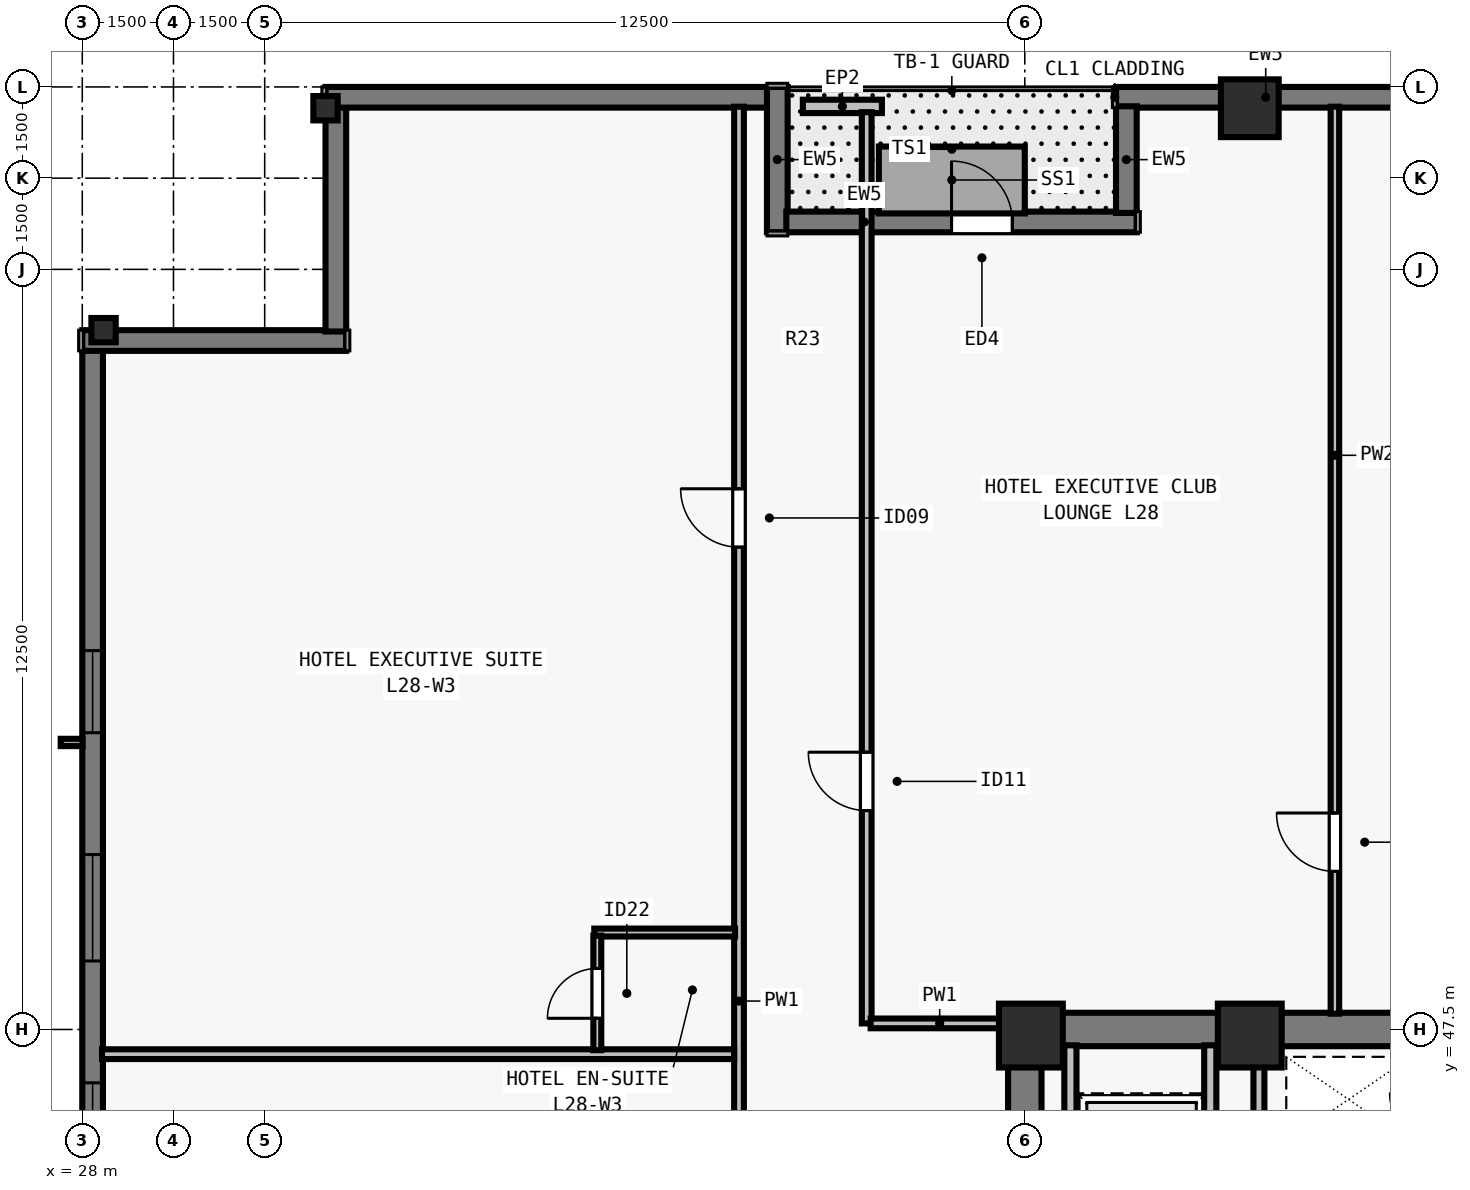
"""IFC4 building model, lengths in metres.
Left out: names, types, materials, properties, quantities, classifications, styles, units other than length and angle.
Written with IfcOpenShell. Run it as: python <this file> out.ifc"""

import sys

from ifc_helpers import new_model, si_unit, direction, frame, frame_2d, origin, origin_2d, place, context, subcontext, project, spatial, rectangle, i_section, extrude, element, fill, save


model = new_model("IFC4")
c1 = context("Model", 3, precision=1e-05, world=origin(), true_north=direction((0.0, 1.0)))
c2 = subcontext(c1, "Body", "Model", "MODEL_VIEW")
j1 = project(units=[si_unit("LENGTHUNIT", "METRE"), si_unit("PLANEANGLEUNIT", "RADIAN")], contexts=[c1])
p1 = place(None, origin())
s1 = spatial("IfcSite", under=j1, at=p1, CompositionType="ELEMENT")
p2 = place(p1, origin())
s2 = spatial("IfcBuilding", under=s1, at=p2, CompositionType="ELEMENT")
p3 = place(p2, frame((0.0, 0.0, 106.0)))
s3 = spatial("IfcBuildingStorey", under=s2, at=p3, CompositionType="ELEMENT", Elevation=106.0)
for number, where, z_axis, x_axis in (
    (1, (43.6, 47.4, 0.0), (0.0, 0.0, 1.0), (1.0, 0.0, 0.0)),
    (2, (47.2, 47.4, 0.0), (0.0, 0.0, 1.0), (1.0, 0.0, 0.0)),
):
    element("IfcColumn", number, at=place(p3, frame(where, z_axis=z_axis, x_axis=x_axis)), inside=s3, PredefinedType="COLUMN", context=c2, shape_type="SweptSolid", body=[
        extrude(rectangle(XDim=1.05, YDim=1.05, at=origin_2d()), origin(), (0.0, 0.0, 1.0), 3.5),
    ])
p4 = place(p3, frame((47.2, 62.65, 0.0), z_axis=(0.0, 0.0, 1.0), x_axis=(1.0, 0.0, 0.0)))
e3 = element("IfcColumn", 3, at=p4, inside=s3, PredefinedType="COLUMN", context=c2, shape_type="SweptSolid", body=[
    extrude(rectangle(XDim=0.95, YDim=0.95, at=origin_2d()), origin(), (0.0, 0.0, 1.0), 3.5),
])
for number, where, z_axis, x_axis in (
    (4, (32.0, 62.65, 0.0), (0.0, 0.0, 1.0), (1.0, 0.0, 0.0)),
    (5, (28.35, 59.0, 0.0), (0.0, 0.0, 1.0), (0.0, 1.0, 0.0)),
):
    element("IfcColumn", number, at=place(p3, frame(where, z_axis=z_axis, x_axis=x_axis)), inside=s3, PredefinedType="COLUMN", context=c2, shape_type="SweptSolid", body=[
        extrude(i_section(OverallWidth=0.4, OverallDepth=0.4, WebThickness=0.022, FlangeThickness=0.036, at=origin_2d()), origin(), (0.0, 0.0, 1.0), 3.5),
    ])
p5 = place(p3, frame((45.0, 62.83, 0.0), z_axis=(0.0, 0.0, 1.0), x_axis=(1.0, 0.0, 0.0)))
e6 = element("IfcWall", 6, at=p5, inside=s3, PredefinedType="SOLIDWALL", context=c2, shape_type="SweptSolid", body=[
    extrude(rectangle(XDim=26.682, YDim=0.34, at=frame_2d((13.341, 0.0))), origin(), (0.0, 0.0, 1.0), 3.28),
])
p6 = place(p5, frame((5.073, 0.0, 0.8)))
e7 = element("IfcOpeningElement", 7, at=p6, cuts=e6, PredefinedType="OPENING", context=c2, shape_type="SweptSolid", body=[
    extrude(rectangle(XDim=1.35, YDim=1.66, at=frame_2d((0.675, 0.83))), frame((0.0, 0.18, 0.0), z_axis=(0.0, -1.0, 0.0), x_axis=(1.0, 0.0, 0.0)), (0.0, 0.0, 1.0), 0.36),
])
p7 = place(p5, frame((8.219, 0.0, 0.8)))
e8 = element("IfcOpeningElement", 8, at=p7, cuts=e6, PredefinedType="OPENING", context=c2, shape_type="SweptSolid", body=[
    extrude(rectangle(XDim=1.75, YDim=1.66, at=frame_2d((0.875, 0.83))), frame((0.0, 0.18, 0.0), z_axis=(0.0, -1.0, 0.0), x_axis=(1.0, 0.0, 0.0)), (0.0, 0.0, 1.0), 0.36),
])
p8 = place(p5, frame((12.666, 0.0, 0.8)))
e9 = element("IfcOpeningElement", 9, at=p8, cuts=e6, PredefinedType="OPENING", context=c2, shape_type="SweptSolid", body=[
    extrude(rectangle(XDim=1.35, YDim=1.66, at=frame_2d((0.675, 0.83))), frame((0.0, 0.18, 0.0), z_axis=(0.0, -1.0, 0.0), x_axis=(1.0, 0.0, 0.0)), (0.0, 0.0, 1.0), 0.36),
])
p9 = place(p5, frame((15.812, 0.0, 0.8)))
e10 = element("IfcOpeningElement", 10, at=p9, cuts=e6, PredefinedType="OPENING", context=c2, shape_type="SweptSolid", body=[
    extrude(rectangle(XDim=1.75, YDim=1.66, at=frame_2d((0.875, 0.83))), frame((0.0, 0.18, 0.0), z_axis=(0.0, -1.0, 0.0), x_axis=(1.0, 0.0, 0.0)), (0.0, 0.0, 1.0), 0.36),
])
p10 = place(p5, frame((20.709, 0.0, 0.8)))
e11 = element("IfcOpeningElement", 11, at=p10, cuts=e6, PredefinedType="OPENING", context=c2, shape_type="SweptSolid", body=[
    extrude(rectangle(XDim=1.35, YDim=1.66, at=frame_2d((0.675, 0.83))), frame((0.0, 0.18, 0.0), z_axis=(0.0, -1.0, 0.0), x_axis=(1.0, 0.0, 0.0)), (0.0, 0.0, 1.0), 0.36),
])
p11 = place(p3, frame((28.17, 19.0, 0.0), z_axis=(0.0, 0.0, 1.0), x_axis=(0.0, 1.0, 0.0)))
e12 = element("IfcWall", 12, at=p11, inside=s3, PredefinedType="SOLIDWALL", context=c2, shape_type="SweptSolid", body=[
    extrude(rectangle(XDim=39.682, YDim=0.34, at=frame_2d((19.841, 0.0))), origin(), (0.0, 0.0, 1.0), 3.28),
])
p12 = place(p11, frame((4.952, 0.0, 0.8)))
e13 = element("IfcOpeningElement", 13, at=p12, cuts=e12, PredefinedType="OPENING", context=c2, shape_type="SweptSolid", body=[
    extrude(rectangle(XDim=1.35, YDim=1.66, at=frame_2d((0.675, 0.83))), frame((0.0, 0.18, 0.0), z_axis=(0.0, -1.0, 0.0), x_axis=(1.0, 0.0, 0.0)), (0.0, 0.0, 1.0), 0.36),
])
p13 = place(p11, frame((8.305, 0.0, 0.8)))
e14 = element("IfcOpeningElement", 14, at=p13, cuts=e12, PredefinedType="OPENING", context=c2, shape_type="SweptSolid", body=[
    extrude(rectangle(XDim=1.75, YDim=1.66, at=frame_2d((0.875, 0.83))), frame((0.0, 0.18, 0.0), z_axis=(0.0, -1.0, 0.0), x_axis=(1.0, 0.0, 0.0)), (0.0, 0.0, 1.0), 0.36),
])
p14 = place(p11, frame((12.509, 0.0, 0.8)))
e15 = element("IfcOpeningElement", 15, at=p14, cuts=e12, PredefinedType="OPENING", context=c2, shape_type="SweptSolid", body=[
    extrude(rectangle(XDim=1.35, YDim=1.66, at=frame_2d((0.675, 0.83))), frame((0.0, 0.18, 0.0), z_axis=(0.0, -1.0, 0.0), x_axis=(1.0, 0.0, 0.0)), (0.0, 0.0, 1.0), 0.36),
])
p15 = place(p11, frame((16.262, 0.0, 0.8)))
e16 = element("IfcOpeningElement", 16, at=p15, cuts=e12, PredefinedType="OPENING", context=c2, shape_type="SweptSolid", body=[
    extrude(rectangle(XDim=1.75, YDim=1.66, at=frame_2d((0.875, 0.83))), frame((0.0, 0.18, 0.0), z_axis=(0.0, -1.0, 0.0), x_axis=(1.0, 0.0, 0.0)), (0.0, 0.0, 1.0), 0.36),
])
p16 = place(p11, frame((19.166, 0.0, 0.8)))
e17 = element("IfcOpeningElement", 17, at=p16, cuts=e12, PredefinedType="OPENING", context=c2, shape_type="SweptSolid", body=[
    extrude(rectangle(XDim=1.35, YDim=1.66, at=frame_2d((0.675, 0.83))), frame((0.0, 0.18, 0.0), z_axis=(0.0, -1.0, 0.0), x_axis=(1.0, 0.0, 0.0)), (0.0, 0.0, 1.0), 0.36),
])
p17 = place(p11, frame((22.07, 0.0, 0.8)))
e18 = element("IfcOpeningElement", 18, at=p17, cuts=e12, PredefinedType="OPENING", context=c2, shape_type="SweptSolid", body=[
    extrude(rectangle(XDim=1.75, YDim=1.66, at=frame_2d((0.875, 0.83))), frame((0.0, 0.18, 0.0), z_axis=(0.0, -1.0, 0.0), x_axis=(1.0, 0.0, 0.0)), (0.0, 0.0, 1.0), 0.36),
])
p18 = place(p11, frame((26.273, 0.0, 0.8)))
e19 = element("IfcOpeningElement", 19, at=p18, cuts=e12, PredefinedType="OPENING", context=c2, shape_type="SweptSolid", body=[
    extrude(rectangle(XDim=1.35, YDim=1.66, at=frame_2d((0.675, 0.83))), frame((0.0, 0.18, 0.0), z_axis=(0.0, -1.0, 0.0), x_axis=(1.0, 0.0, 0.0)), (0.0, 0.0, 1.0), 0.36),
])
p19 = place(p11, frame((29.627, 0.0, 0.8)))
e20 = element("IfcOpeningElement", 20, at=p19, cuts=e12, PredefinedType="OPENING", context=c2, shape_type="SweptSolid", body=[
    extrude(rectangle(XDim=1.75, YDim=1.66, at=frame_2d((0.875, 0.83))), frame((0.0, 0.18, 0.0), z_axis=(0.0, -1.0, 0.0), x_axis=(1.0, 0.0, 0.0)), (0.0, 0.0, 1.0), 0.36),
])
p20 = place(p11, frame((33.38, 0.0, 0.8)))
e21 = element("IfcOpeningElement", 21, at=p20, cuts=e12, PredefinedType="OPENING", context=c2, shape_type="SweptSolid", body=[
    extrude(rectangle(XDim=1.35, YDim=1.66, at=frame_2d((0.675, 0.83))), frame((0.0, 0.18, 0.0), z_axis=(0.0, -1.0, 0.0), x_axis=(1.0, 0.0, 0.0)), (0.0, 0.0, 1.0), 0.36),
])
p21 = place(p3, frame((28.0, 58.83, 0.0), z_axis=(0.0, 0.0, 1.0), x_axis=(1.0, 0.0, 0.0)))
e22 = element("IfcWall", 22, at=p21, inside=s3, PredefinedType="SOLIDWALL", context=c2, shape_type="SweptSolid", body=[
    extrude(rectangle(XDim=4.34, YDim=0.34, at=frame_2d((2.17, 0.0))), origin(), (0.0, 0.0, 1.0), 3.28),
])
p22 = place(p3, frame((32.17, 58.978, 0.0), z_axis=(0.0, 0.0, 1.0), x_axis=(0.0, 1.0, 0.0)))
e23 = element("IfcWall", 23, at=p22, inside=s3, PredefinedType="SOLIDWALL", context=c2, shape_type="SweptSolid", body=[
    extrude(rectangle(XDim=3.704, YDim=0.34, at=frame_2d((1.852, 0.0))), origin(), (0.0, 0.0, 1.0), 3.28),
])
p23 = place(p3, frame((32.0, 62.83, 0.0), z_axis=(0.0, 0.0, 1.0), x_axis=(1.0, 0.0, 0.0)))
e24 = element("IfcWall", 24, at=p23, inside=s3, PredefinedType="SOLIDWALL", context=c2, shape_type="SweptSolid", body=[
    extrude(rectangle(XDim=7.282, YDim=0.34, at=frame_2d((3.641, 0.0))), origin(), (0.0, 0.0, 1.0), 3.28),
])
p24 = place(p3, frame((39.43, 63.0, 0.0), z_axis=(0.0, 0.0, 1.0), x_axis=(0.0, -1.0, 0.0)))
e25 = element("IfcWall", 25, at=p24, inside=s3, PredefinedType="SOLIDWALL", context=c2, shape_type="SweptSolid", body=[
    extrude(rectangle(XDim=2.39, YDim=0.34, at=frame_2d((1.195, 0.0))), origin(), (0.0, 0.0, 1.0), 3.28),
])
p25 = place(p3, frame((39.578, 60.78, 0.0), z_axis=(0.0, 0.0, 1.0), x_axis=(1.0, 0.0, 0.0)))
e26 = element("IfcWall", 26, at=p25, inside=s3, PredefinedType="SOLIDWALL", context=c2, shape_type="SweptSolid", body=[
    extrude(rectangle(XDim=5.762, YDim=0.34, at=frame_2d((2.881, 0.0))), origin(), (0.0, 0.0, 1.0), 3.28),
])
p26 = place(p25, frame((2.717, 0.0, 0.0)))
e27 = element("IfcOpeningElement", 27, at=p26, cuts=e26, PredefinedType="OPENING", context=c2, shape_type="SweptSolid", body=[
    extrude(rectangle(XDim=1.0, YDim=2.15, at=frame_2d((0.5, 1.075))), frame((0.0, 0.18, 0.0), z_axis=(0.0, -1.0, 0.0), x_axis=(1.0, 0.0, 0.0)), (0.0, 0.0, 1.0), 0.36),
])
p27 = place(p3, frame((45.17, 60.928, 0.0), z_axis=(0.0, 0.0, 1.0), x_axis=(0.0, 1.0, 0.0)))
e28 = element("IfcWall", 28, at=p27, inside=s3, PredefinedType="SOLIDWALL", context=c2, shape_type="SweptSolid", body=[
    extrude(rectangle(XDim=1.754, YDim=0.34, at=frame_2d((0.877, 0.0))), origin(), (0.0, 0.0, 1.0), 3.28),
])
p28 = place(p3, frame((39.85, 62.68, 0.0), z_axis=(0.0, 0.0, 1.0), x_axis=(1.0, 0.0, 0.0)))
e29 = element("IfcWall", 29, at=p28, inside=s3, PredefinedType="PARAPET", context=c2, shape_type="SweptSolid", body=[
    extrude(rectangle(XDim=1.3, YDim=0.22, at=frame_2d((0.65, 0.0))), origin(), (0.0, 0.0, 1.0), 0.55),
])
p29 = place(p3, frame((43.225, 47.5, 0.0), z_axis=(0.0, 0.0, 1.0), x_axis=(1.0, 0.0, 0.0)))
e30 = element("IfcWall", 30, at=p29, inside=s3, PredefinedType="SHEAR", context=c2, shape_type="SweptSolid", body=[
    extrude(rectangle(XDim=17.55, YDim=0.55, at=frame_2d((8.775, 0.0))), origin(), (0.0, 0.0, 1.0), 3.28),
])
p30 = place(p3, frame((43.5, 40.8, 0.0), z_axis=(0.0, 0.0, 1.0), x_axis=(0.0, 1.0, 0.0)))
e31 = element("IfcWall", 31, at=p30, inside=s3, PredefinedType="SHEAR", context=c2, shape_type="SweptSolid", body=[
    extrude(rectangle(XDim=6.435, YDim=0.55, at=frame_2d((3.218, 0.0))), origin(), (0.0, 0.0, 1.0), 3.28),
])
for number, where, z_axis, x_axis in (
    (32, (46.55, 43.735, 0.0), (0.0, 0.0, 1.0), (0.0, 1.0, 0.0)),
    (33, (44.25, 43.735, 0.0), (0.0, 0.0, 1.0), (0.0, 1.0, 0.0)),
):
    element("IfcWall", number, at=place(p3, frame(where, z_axis=z_axis, x_axis=x_axis)), inside=s3, PredefinedType="SOLIDWALL", context=c2, shape_type="SweptSolid", body=[
        extrude(rectangle(XDim=3.505, YDim=0.2, at=frame_2d((1.752, 0.0))), origin(), (0.0, 0.0, 1.0), 3.28),
    ])
p31 = place(p3, frame((47.35, 43.735, 0.0), z_axis=(0.0, 0.0, 1.0), x_axis=(0.0, 1.0, 0.0)))
e34 = element("IfcWall", 34, at=p31, inside=s3, PredefinedType="SOLIDWALL", context=c2, shape_type="SweptSolid", body=[
    extrude(rectangle(XDim=3.505, YDim=0.18, at=frame_2d((1.752, 0.0))), origin(), (0.0, 0.0, 1.0), 3.28),
])
p32 = place(p3, frame((38.8, 15.325, 0.0), z_axis=(0.0, 0.0, 1.0), x_axis=(0.0, 1.0, 0.0)))
e35 = element("IfcWall", 35, at=p32, inside=s3, PredefinedType="PARTITIONING", context=c2, shape_type="SweptSolid", body=[
    extrude(rectangle(XDim=47.35, YDim=0.16, at=frame_2d((23.675, 0.0))), origin(), (0.0, 0.0, 1.0), 2.555),
])
p33 = place(p32, frame((8.606, 0.0, 0.0)))
e36 = element("IfcOpeningElement", 36, at=p33, cuts=e35, PredefinedType="OPENING", context=c2, shape_type="SweptSolid", body=[
    extrude(rectangle(XDim=0.96, YDim=2.15, at=frame_2d((0.48, 1.075))), frame((0.0, 0.09, 0.0), z_axis=(0.0, -1.0, 0.0), x_axis=(1.0, 0.0, 0.0)), (0.0, 0.0, 1.0), 0.18),
])
p34 = place(p32, frame((24.218, 0.0, 0.0)))
e37 = element("IfcOpeningElement", 37, at=p34, cuts=e35, PredefinedType="OPENING", context=c2, shape_type="SweptSolid", body=[
    extrude(rectangle(XDim=0.96, YDim=2.15, at=frame_2d((0.48, 1.075))), frame((0.0, 0.09, 0.0), z_axis=(0.0, -1.0, 0.0), x_axis=(1.0, 0.0, 0.0)), (0.0, 0.0, 1.0), 0.18),
])
p35 = place(p32, frame((40.107, 0.0, 0.0)))
e38 = element("IfcOpeningElement", 38, at=p35, cuts=e35, PredefinedType="OPENING", context=c2, shape_type="SweptSolid", body=[
    extrude(rectangle(XDim=0.96, YDim=2.15, at=frame_2d((0.48, 1.075))), frame((0.0, 0.09, 0.0), z_axis=(0.0, -1.0, 0.0), x_axis=(1.0, 0.0, 0.0)), (0.0, 0.0, 1.0), 0.18),
])
p36 = place(p3, frame((40.9, 47.6, 0.0), z_axis=(0.0, 0.0, 1.0), x_axis=(0.0, 1.0, 0.0)))
e39 = element("IfcWall", 39, at=p36, inside=s3, PredefinedType="PARTITIONING", context=c2, shape_type="SweptSolid", body=[
    extrude(rectangle(XDim=14.985, YDim=0.16, at=frame_2d((7.492, 0.0))), origin(), (0.0, 0.0, 1.0), 2.555),
])
p37 = place(p36, frame((3.5, 0.0, 0.0)))
e40 = element("IfcOpeningElement", 40, at=p37, cuts=e39, PredefinedType="OPENING", context=c2, shape_type="SweptSolid", body=[
    extrude(rectangle(XDim=0.96, YDim=2.12, at=frame_2d((0.48, 1.06))), frame((0.0, 0.09, 0.0), z_axis=(0.0, -1.0, 0.0), x_axis=(1.0, 0.0, 0.0)), (0.0, 0.0, 1.0), 0.18),
])
p38 = place(p3, frame((40.965, 47.6, 0.0), z_axis=(0.0, 0.0, 1.0), x_axis=(1.0, 0.0, 0.0)))
e41 = element("IfcWall", 41, at=p38, inside=s3, PredefinedType="PARTITIONING", context=c2, shape_type="SweptSolid", body=[
    extrude(rectangle(XDim=2.27, YDim=0.16, at=frame_2d((1.135, 0.0))), origin(), (0.0, 0.0, 1.0), 3.28),
])
p39 = place(p3, frame((48.6, 47.76, 0.0), z_axis=(0.0, 0.0, 1.0), x_axis=(0.0, 1.0, 0.0)))
e42 = element("IfcWall", 42, at=p39, inside=s3, PredefinedType="PARTITIONING", context=c2, shape_type="SweptSolid", body=[
    extrude(rectangle(XDim=14.915, YDim=0.14, at=frame_2d((7.458, 0.0))), origin(), (0.0, 0.0, 1.0), 2.896),
])
p40 = place(p39, frame((2.34, 0.0, 0.0)))
e43 = element("IfcOpeningElement", 43, at=p40, cuts=e42, PredefinedType="OPENING", context=c2, shape_type="SweptSolid", body=[
    extrude(rectangle(XDim=0.96, YDim=2.12, at=frame_2d((0.48, 1.06))), frame((0.0, 0.08, 0.0), z_axis=(0.0, -1.0, 0.0), x_axis=(1.0, 0.0, 0.0)), (0.0, 0.0, 1.0), 0.16),
])
p41 = place(p3, frame((28.325, 47.094, 0.0), z_axis=(0.0, 0.0, 1.0), x_axis=(1.0, 0.0, 0.0)))
e44 = element("IfcWall", 44, at=p41, inside=s3, PredefinedType="PARTITIONING", context=c2, shape_type="SweptSolid", body=[
    extrude(rectangle(XDim=10.395, YDim=0.16, at=frame_2d((5.198, 0.0))), origin(), (0.0, 0.0, 1.0), 3.28),
])
p42 = place(p3, frame((36.42, 49.094, 0.0), z_axis=(0.0, 0.0, 1.0), x_axis=(1.0, 0.0, 0.0)))
e45 = element("IfcWall", 45, at=p42, inside=s3, PredefinedType="PLUMBINGWALL", context=c2, shape_type="SweptSolid", body=[
    extrude(rectangle(XDim=2.315, YDim=0.13, at=frame_2d((1.158, 0.0))), origin(), (0.0, 0.0, 1.0), 3.28),
])
p43 = place(p3, frame((36.47, 47.159, 0.0), z_axis=(0.0, 0.0, 1.0), x_axis=(0.0, 1.0, 0.0)))
e46 = element("IfcWall", 46, at=p43, inside=s3, PredefinedType="PLUMBINGWALL", context=c2, shape_type="SweptSolid", body=[
    extrude(rectangle(XDim=1.885, YDim=0.13, at=frame_2d((0.942, 0.0))), origin(), (0.0, 0.0, 1.0), 3.28),
])
p44 = place(p43, frame((0.525, 0.0, 0.0)))
e47 = element("IfcOpeningElement", 47, at=p44, cuts=e46, PredefinedType="OPENING", context=c2, shape_type="SweptSolid", body=[
    extrude(rectangle(XDim=0.82, YDim=2.1, at=frame_2d((0.41, 1.05))), frame((0.0, 0.075, 0.0), z_axis=(0.0, -1.0, 0.0), x_axis=(1.0, 0.0, 0.0)), (0.0, 0.0, 1.0), 0.15),
])
p45 = place(p18, origin())
e48 = element("IfcWindow", 48, at=p45, inside=s3, PartitioningType="SINGLE_PANEL", PredefinedType="WINDOW", context=c2, shape_type="SweptSolid", body=[
    extrude(rectangle(XDim=1.35, YDim=1.66, at=frame_2d((0.675, 0.83))), frame((0.0, -0.05, 0.0), z_axis=(0.0, -1.0, 0.0), x_axis=(1.0, 0.0, 0.0)), (0.0, 0.0, 1.0), 0.06),
])
fill(e19, e48)
p46 = place(p19, origin())
e49 = element("IfcWindow", 49, at=p46, inside=s3, PartitioningType="SINGLE_PANEL", PredefinedType="WINDOW", context=c2, shape_type="SweptSolid", body=[
    extrude(rectangle(XDim=1.75, YDim=1.66, at=frame_2d((0.875, 0.83))), frame((0.0, -0.05, 0.0), z_axis=(0.0, -1.0, 0.0), x_axis=(1.0, 0.0, 0.0)), (0.0, 0.0, 1.0), 0.06),
])
fill(e20, e49)
p47 = place(p20, origin())
e50 = element("IfcWindow", 50, at=p47, inside=s3, PartitioningType="SINGLE_PANEL", PredefinedType="WINDOW", context=c2, shape_type="SweptSolid", body=[
    extrude(rectangle(XDim=1.35, YDim=1.66, at=frame_2d((0.675, 0.83))), frame((0.0, -0.05, 0.0), z_axis=(0.0, -1.0, 0.0), x_axis=(1.0, 0.0, 0.0)), (0.0, 0.0, 1.0), 0.06),
])
fill(e21, e50)
p48 = place(p26, origin())
e51 = element("IfcDoor", 51, at=p48, inside=s3, OperationType="SINGLE_SWING_LEFT", PredefinedType="DOOR", context=c2, shape_type="SweptSolid", body=[
    extrude(rectangle(XDim=1.0, YDim=2.15, at=frame_2d((0.5, 1.075))), frame((0.0, 0.025, 0.0), z_axis=(0.0, -1.0, 0.0), x_axis=(1.0, 0.0, 0.0)), (0.0, 0.0, 1.0), 0.05),
])
fill(e27, e51)
p49 = place(p37, origin())
e52 = element("IfcDoor", 52, at=p49, inside=s3, OperationType="SINGLE_SWING_RIGHT", PredefinedType="DOOR", context=c2, shape_type="SweptSolid", body=[
    extrude(rectangle(XDim=0.96, YDim=2.12, at=frame_2d((0.48, 1.06))), frame((0.0, 0.025, 0.0), z_axis=(0.0, -1.0, 0.0), x_axis=(1.0, 0.0, 0.0)), (0.0, 0.0, 1.0), 0.05),
])
fill(e40, e52)
p50 = place(p40, origin())
e53 = element("IfcDoor", 53, at=p50, inside=s3, OperationType="SINGLE_SWING_RIGHT", PredefinedType="DOOR", context=c2, shape_type="SweptSolid", body=[
    extrude(rectangle(XDim=0.96, YDim=2.12, at=frame_2d((0.48, 1.06))), frame((0.0, 0.025, 0.0), z_axis=(0.0, -1.0, 0.0), x_axis=(1.0, 0.0, 0.0)), (0.0, 0.0, 1.0), 0.05),
])
fill(e43, e53)
p51 = place(p44, origin())
e54 = element("IfcDoor", 54, at=p51, inside=s3, OperationType="SINGLE_SWING_LEFT", PredefinedType="DOOR", context=c2, shape_type="SweptSolid", body=[
    extrude(rectangle(XDim=0.82, YDim=2.1, at=frame_2d((0.41, 1.05))), frame((0.0, 0.025, 0.0), z_axis=(0.0, -1.0, 0.0), x_axis=(1.0, 0.0, 0.0)), (0.0, 0.0, 1.0), 0.05),
])
fill(e47, e54)
p52 = place(p35, origin())
e55 = element("IfcDoor", 55, at=p52, inside=s3, OperationType="SINGLE_SWING_RIGHT", PredefinedType="DOOR", context=c2, shape_type="SweptSolid", body=[
    extrude(rectangle(XDim=0.96, YDim=2.15, at=frame_2d((0.48, 1.075))), frame((0.0, 0.025, 0.0), z_axis=(0.0, -1.0, 0.0), x_axis=(1.0, 0.0, 0.0)), (0.0, 0.0, 1.0), 0.05),
])
fill(e38, e55)
save(model, sys.argv[1])
